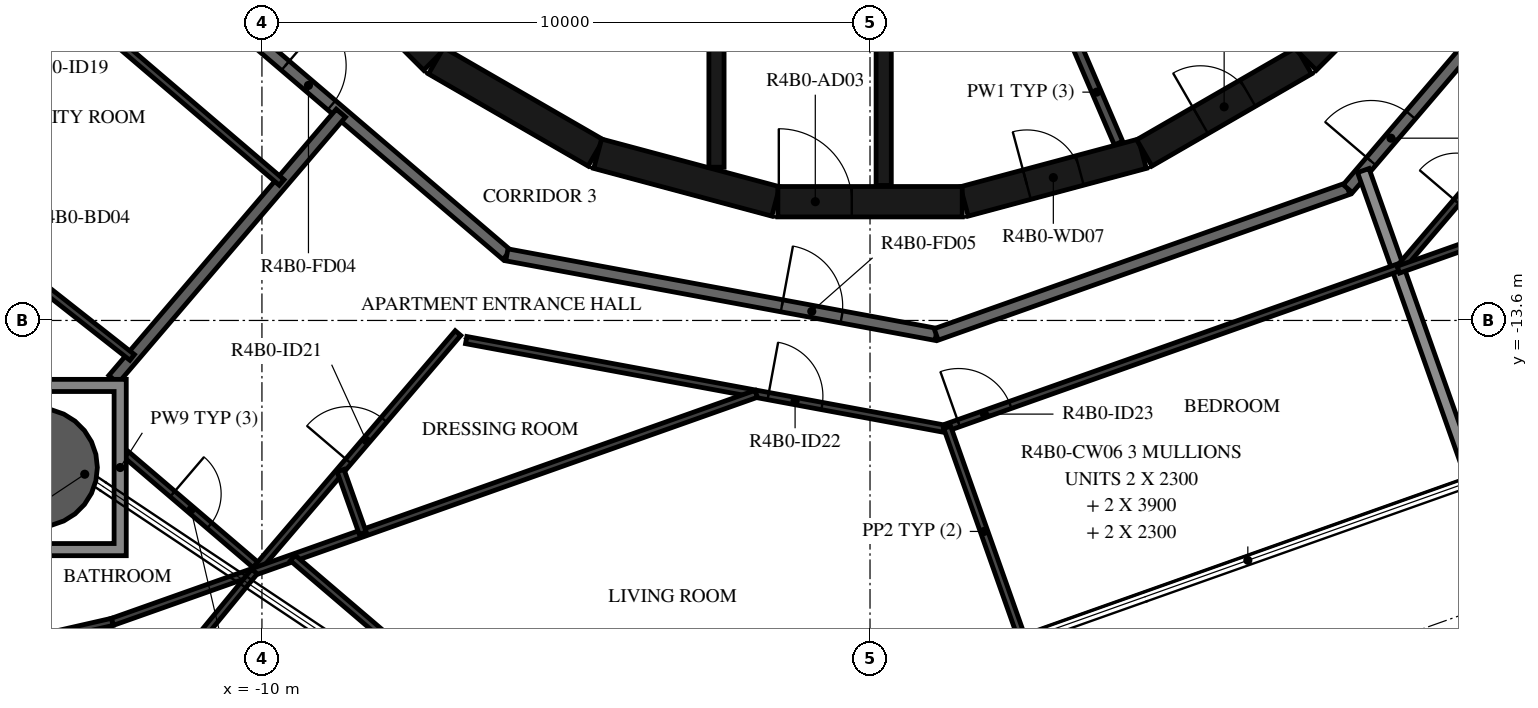
"""IFC4 building model, lengths in metres.
Left out: names, types, materials, properties, quantities, classifications, styles, units other than length and angle.
Written with IfcOpenShell. Run it as: python <this file> out.ifc"""

import sys

from ifc_helpers import new_model, si_unit, direction, frame, frame_2d, origin, origin_2d, place, context, subcontext, project, spatial, polyline, rectangle, hollow_circle, outline, extrude, element, fill, save


model = new_model("IFC4")
c1 = context("Model", 3, precision=1e-05, world=origin(), true_north=direction((0.0, 1.0)))
c2 = subcontext(c1, "Body", "Model", "MODEL_VIEW")
j1 = project(units=[si_unit("LENGTHUNIT", "METRE"), si_unit("PLANEANGLEUNIT", "RADIAN")], contexts=[c1])
p1 = place(None, origin())
s1 = spatial("IfcSite", under=j1, at=p1, CompositionType="ELEMENT")
p2 = place(p1, origin())
s2 = spatial("IfcBuilding", under=s1, at=p2, CompositionType="ELEMENT")
p3 = place(p2, frame((0.0, 0.0, 165.7)))
s3 = spatial("IfcBuildingStorey", under=s2, at=p3, CompositionType="ELEMENT", Elevation=165.7)
p4 = place(p3, frame((-13.681, -16.019, -0.38), z_axis=(0.0, 0.0, 1.0), x_axis=(1.0, 0.0, 0.0)))
e1 = element("IfcColumn", 1, at=p4, inside=s3, PredefinedType="COLUMN", context=c2, shape_type="SweptSolid", body=[
    extrude(hollow_circle(Radius=0.975, WallThickness=0.045, at=origin_2d()), origin(), (0.0, 0.0, 1.0), 3.5),
])
p5 = place(p3, frame((1.55, -11.643, 0.0), z_axis=(0.0, 0.0, 1.0), x_axis=(0.965948410781, 0.258734743916, 0.0)))
e2 = element("IfcWall", 2, at=p5, inside=s3, PredefinedType="SHEAR", context=c2, shape_type="SweptSolid", body=[
    extrude(rectangle(XDim=3.033, YDim=0.5, at=frame_2d((1.516, 0.0))), origin(), (0.0, 0.0, 1.0), 3.12),
])
p6 = place(p5, frame((1.066, 0.0, 0.0)))
e3 = element("IfcOpeningElement", 3, at=p6, cuts=e2, PredefinedType="OPENING", context=c2, shape_type="SweptSolid", body=[
    extrude(rectangle(XDim=0.9, YDim=2.1, at=frame_2d((0.45, 1.05))), frame((0.0, 0.26, 0.0), z_axis=(0.0, -1.0, 0.0), x_axis=(1.0, 0.0, 0.0)), (0.0, 0.0, 1.0), 0.52),
])
p7 = place(p3, frame((4.51, -10.845, 0.0), z_axis=(0.0, 0.0, 1.0), x_axis=(0.865975092491, 0.500087131594, 0.0)))
e4 = element("IfcWall", 4, at=p7, inside=s3, PredefinedType="SHEAR", context=c2, shape_type="SweptSolid", body=[
    extrude(rectangle(XDim=3.033, YDim=0.5, at=frame_2d((1.516, 0.0))), origin(), (0.0, 0.0, 1.0), 3.12),
])
p8 = place(p7, frame((1.066, 0.0, 0.0)))
e5 = element("IfcOpeningElement", 5, at=p8, cuts=e4, PredefinedType="OPENING", context=c2, shape_type="SweptSolid", body=[
    extrude(rectangle(XDim=0.9, YDim=2.1, at=frame_2d((0.45, 1.05))), frame((0.0, 0.26, 0.0), z_axis=(0.0, -1.0, 0.0), x_axis=(1.0, 0.0, 0.0)), (0.0, 0.0, 1.0), 0.52),
])
p9 = place(p3, frame((7.164, -9.308, 0.0), z_axis=(0.0, 0.0, 1.0), x_axis=(0.707106781187, 0.707106781187, 0.0)))
e6 = element("IfcWall", 6, at=p9, inside=s3, PredefinedType="SHEAR", context=c2, shape_type="SweptSolid", body=[
    extrude(rectangle(XDim=3.032, YDim=0.5, at=frame_2d((1.516, 0.0))), origin(), (0.0, 0.0, 1.0), 3.12),
])
p10 = place(p9, frame((1.566, 0.0, 0.0)))
e7 = element("IfcOpeningElement", 7, at=p10, cuts=e6, PredefinedType="OPENING", context=c2, shape_type="SweptSolid", body=[
    extrude(rectangle(XDim=0.9, YDim=2.1, at=frame_2d((0.45, 1.05))), frame((0.0, 0.26, 0.0), z_axis=(0.0, -1.0, 0.0), x_axis=(1.0, 0.0, 0.0)), (0.0, 0.0, 1.0), 0.52),
])
p11 = place(p3, frame((-9.308, -7.164, 0.0), z_axis=(0.0, 0.0, 1.0), x_axis=(0.707106781187, -0.707106781187, 0.0)))
e8 = element("IfcWall", 8, at=p11, inside=s3, PredefinedType="SHEAR", context=c2, shape_type="SweptSolid", body=[
    extrude(rectangle(XDim=3.032, YDim=0.5, at=frame_2d((1.516, 0.0))), origin(), (0.0, 0.0, 1.0), 3.12),
])
for number, where, z_axis, x_axis in (
    (9, (-7.137, -9.329, 0.0), (0.0, 0.0, 1.0), (0.866, -0.5, 0.0)),
    (10, (-4.479, -10.858, 0.0), (0.0, 0.0, 1.0), (0.966, -0.259, 0.0)),
):
    element("IfcWall", number, at=place(p3, frame(where, z_axis=z_axis, x_axis=x_axis)), inside=s3, PredefinedType="SHEAR", context=c2, shape_type="SweptSolid", body=[
        extrude(rectangle(XDim=3.033, YDim=0.5, at=frame_2d((1.516, 0.0))), origin(), (0.0, 0.0, 1.0), 3.12),
    ])
p12 = place(p3, frame((-1.516, -11.647, 0.0), z_axis=(0.0, 0.0, 1.0), x_axis=(1.0, 0.0, 0.0)))
e11 = element("IfcWall", 11, at=p12, inside=s3, PredefinedType="SHEAR", context=c2, shape_type="SweptSolid", body=[
    extrude(rectangle(XDim=3.033, YDim=0.5, at=frame_2d((1.516, 0.0))), origin(), (0.0, 0.0, 1.0), 3.12),
])
p13 = place(p12, frame((0.016, 0.0, 0.0)))
e12 = element("IfcOpeningElement", 12, at=p13, cuts=e11, PredefinedType="OPENING", context=c2, shape_type="SweptSolid", body=[
    extrude(rectangle(XDim=1.2, YDim=2.1, at=frame_2d((0.6, 1.05))), frame((0.0, 0.26, 0.0), z_axis=(0.0, -1.0, 0.0), x_axis=(1.0, 0.0, 0.0)), (0.0, 0.0, 1.0), 0.52),
])
p14 = place(p3, frame((-2.525, -8.97, 0.0), z_axis=(0.0, 0.0, 1.0), x_axis=(0.0, -1.0, 0.0)))
e13 = element("IfcWall", 13, at=p14, inside=s3, PredefinedType="SHEAR", context=c2, shape_type="SweptSolid", body=[
    extrude(rectangle(XDim=2.11, YDim=0.25, at=frame_2d((1.055, 0.0))), origin(), (0.0, 0.0, 1.0), 3.12),
])
p15 = place(p3, frame((0.225, -8.97, 0.0), z_axis=(0.0, 0.0, 1.0), x_axis=(0.0, -1.0, 0.0)))
e14 = element("IfcWall", 14, at=p15, inside=s3, PredefinedType="SHEAR", context=c2, shape_type="SweptSolid", body=[
    extrude(rectangle(XDim=2.41, YDim=0.25, at=frame_2d((1.205, 0.0))), origin(), (0.0, 0.0, 1.0), 3.12),
])
p16 = place(p3, frame((3.367, -9.007, 0.0), z_axis=(0.0, 0.0, 1.0), x_axis=(0.394387482265, -0.918944238696, 0.0)))
e15 = element("IfcWall", 15, at=p16, inside=s3, PredefinedType="PARTITIONING", context=c2, shape_type="SweptSolid", body=[
    extrude(rectangle(XDim=1.825, YDim=0.15, at=frame_2d((0.913, 0.0))), origin(), (0.0, 0.0, 1.0), 3.12),
])
p17 = place(p3, frame((-11.433, -7.858, 0.0), z_axis=(0.0, 0.0, 1.0), x_axis=(0.760412154545, -0.649440801937, 0.0)))
e16 = element("IfcWall", 16, at=p17, inside=s3, PredefinedType="STANDARD", context=c2, shape_type="SweptSolid", body=[
    extrude(rectangle(XDim=7.181, YDim=0.2, at=frame_2d((3.59, 0.0))), origin(), (0.0, 0.0, 1.0), 3.12),
])
p18 = place(p17, frame((2.39, 0.0, 0.0)))
e17 = element("IfcOpeningElement", 17, at=p18, cuts=e16, PredefinedType="OPENING", context=c2, shape_type="SweptSolid", body=[
    extrude(rectangle(XDim=1.0, YDim=2.1, at=frame_2d((0.5, 1.05))), frame((0.0, 0.11, 0.0), z_axis=(0.0, -1.0, 0.0), x_axis=(1.0, 0.0, 0.0)), (0.0, 0.0, 1.0), 0.22),
])
p19 = place(p3, frame((-5.972, -12.521, 0.0), z_axis=(0.0, 0.0, 1.0), x_axis=(0.983256068163, -0.18222926335, 0.0)))
e18 = element("IfcWall", 18, at=p19, inside=s3, PredefinedType="STANDARD", context=c2, shape_type="SweptSolid", body=[
    extrude(rectangle(XDim=7.181, YDim=0.2, at=frame_2d((3.59, 0.0))), origin(), (0.0, 0.0, 1.0), 3.12),
])
p20 = place(p19, frame((4.6, 0.0, 0.0)))
e19 = element("IfcOpeningElement", 19, at=p20, cuts=e18, PredefinedType="OPENING", context=c2, shape_type="SweptSolid", body=[
    extrude(rectangle(XDim=1.0, YDim=2.1, at=frame_2d((0.5, 1.05))), frame((0.0, 0.11, 0.0), z_axis=(0.0, -1.0, 0.0), x_axis=(1.0, 0.0, 0.0)), (0.0, 0.0, 1.0), 0.22),
])
p21 = place(p3, frame((1.088, -13.83, 0.0), z_axis=(0.0, 0.0, 1.0), x_axis=(0.942648397945, 0.333787354241, 0.0)))
e20 = element("IfcWall", 20, at=p21, inside=s3, PredefinedType="STANDARD", context=c2, shape_type="SweptSolid", body=[
    extrude(rectangle(XDim=7.181, YDim=0.2, at=frame_2d((3.591, 0.0))), origin(), (0.0, 0.0, 1.0), 3.12),
])
p22 = place(p3, frame((7.858, -11.433, 0.0), z_axis=(0.0, 0.0, 1.0), x_axis=(0.649440801937, 0.760412154545, 0.0)))
e21 = element("IfcWall", 21, at=p22, inside=s3, PredefinedType="STANDARD", context=c2, shape_type="SweptSolid", body=[
    extrude(rectangle(XDim=7.181, YDim=0.2, at=frame_2d((3.59, 0.0))), origin(), (0.0, 0.0, 1.0), 3.12),
])
p23 = place(p22, frame((0.592, 0.0, 0.0)))
e22 = element("IfcOpeningElement", 22, at=p23, cuts=e21, PredefinedType="OPENING", context=c2, shape_type="SweptSolid", body=[
    extrude(rectangle(XDim=1.0, YDim=2.1, at=frame_2d((0.5, 1.05))), frame((0.0, 0.11, 0.0), z_axis=(0.0, -1.0, 0.0), x_axis=(1.0, 0.0, 0.0)), (0.0, 0.0, 1.0), 0.22),
])
p24 = place(p3, frame((-12.441, -14.569, 0.0), z_axis=(0.0, 0.0, 1.0), x_axis=(0.649446013128, 0.760407703822, 0.0)))
e23 = element("IfcWall", 23, at=p24, inside=s3, PredefinedType="STANDARD", context=c2, shape_type="SweptSolid", body=[
    extrude(rectangle(XDim=5.758, YDim=0.2, at=frame_2d((2.879, 0.0))), origin(), (0.0, 0.0, 1.0), 3.12),
])
p25 = place(p3, frame((9.891, -16.158, 0.0), z_axis=(0.0, 0.0, 1.0), x_axis=(-0.333807281402, 0.942641341594, 0.0)))
e24 = element("IfcWall", 24, at=p25, inside=s3, PredefinedType="STANDARD", context=c2, shape_type="SweptSolid", body=[
    extrude(rectangle(XDim=5.329, YDim=0.2, at=frame_2d((2.665, 0.0))), origin(), (0.0, 0.0, 1.0), 2.73),
])
p26 = place(p3, frame((-12.713, -8.737, 0.0), z_axis=(0.0, 0.0, 1.0), x_axis=(0.760420863476, -0.649430604754, 0.0)))
e25 = element("IfcWall", 25, at=p26, inside=s3, PredefinedType="PARTITIONING", context=c2, shape_type="SweptSolid", body=[
    extrude(rectangle(XDim=3.992, YDim=0.12, at=frame_2d((1.996, 0.0))), origin(), (0.0, 0.0, 1.0), 3.12),
])
p27 = place(p3, frame((-15.677, -11.42, 0.0), z_axis=(0.0, 0.0, 1.0), x_axis=(0.785821888461, -0.618452875824, 0.0)))
e26 = element("IfcWall", 26, at=p27, inside=s3, PredefinedType="PARTITIONING", context=c2, shape_type="SweptSolid", body=[
    extrude(rectangle(XDim=4.507, YDim=0.12, at=frame_2d((2.254, 0.0))), origin(), (0.0, 0.0, 1.0), 3.12),
])
p28 = place(p27, frame((0.4, 0.0, 0.0)))
e27 = element("IfcOpeningElement", 27, at=p28, cuts=e26, PredefinedType="OPENING", context=c2, shape_type="SweptSolid", body=[
    extrude(rectangle(XDim=0.8, YDim=2.1, at=frame_2d((0.4, 1.05))), frame((0.0, 0.07, 0.0), z_axis=(0.0, -1.0, 0.0), x_axis=(1.0, 0.0, 0.0)), (0.0, 0.0, 1.0), 0.14),
])
p29 = place(p3, frame((-12.231, -15.804, 0.0), z_axis=(0.0, 0.0, 1.0), x_axis=(0.760403625387, -0.649450788357, 0.0)))
e28 = element("IfcWall", 28, at=p29, inside=s3, PredefinedType="PARTITIONING", context=c2, shape_type="SweptSolid", body=[
    extrude(rectangle(XDim=2.852, YDim=0.12, at=frame_2d((1.426, 0.0))), origin(), (0.0, 0.0, 1.0), 3.12),
])
p30 = place(p29, frame((1.0, 0.0, 0.0)))
e29 = element("IfcOpeningElement", 29, at=p30, cuts=e28, PredefinedType="OPENING", context=c2, shape_type="SweptSolid", body=[
    extrude(rectangle(XDim=0.8, YDim=2.1, at=frame_2d((0.4, 1.05))), frame((0.0, 0.07, 0.0), z_axis=(0.0, -1.0, 0.0), x_axis=(1.0, 0.0, 0.0)), (0.0, 0.0, 1.0), 0.14),
])
p31 = place(p3, frame((-10.063, -17.656, 0.0), z_axis=(0.0, 0.0, 1.0), x_axis=(0.649451567172, 0.760402960211, 0.0)))
e30 = element("IfcWall", 30, at=p31, inside=s3, PredefinedType="PARTITIONING", context=c2, shape_type="SweptSolid", body=[
    extrude(rectangle(XDim=5.061, YDim=0.12, at=frame_2d((2.531, 0.0))), origin(), (0.0, 0.0, 1.0), 3.12),
])
p32 = place(p31, frame((2.288, 0.0, 0.0)))
e31 = element("IfcOpeningElement", 31, at=p32, cuts=e30, PredefinedType="OPENING", context=c2, shape_type="SweptSolid", body=[
    extrude(rectangle(XDim=0.9, YDim=2.1, at=frame_2d((0.45, 1.05))), frame((0.0, 0.07, 0.0), z_axis=(0.0, -1.0, 0.0), x_axis=(1.0, 0.0, 0.0)), (0.0, 0.0, 1.0), 0.14),
])
p33 = place(p3, frame((-6.641, -13.923, 0.0), z_axis=(0.0, 0.0, 1.0), x_axis=(0.983250157272, -0.182261153912, 0.0)))
e32 = element("IfcWall", 32, at=p33, inside=s3, PredefinedType="PARTITIONING", context=c2, shape_type="SweptSolid", body=[
    extrude(rectangle(XDim=7.985, YDim=0.12, at=frame_2d((3.992, 0.0))), origin(), (0.0, 0.0, 1.0), 3.12),
])
p34 = place(p33, frame((5.051, 0.0, 0.0)))
e33 = element("IfcOpeningElement", 33, at=p34, cuts=e32, PredefinedType="OPENING", context=c2, shape_type="SweptSolid", body=[
    extrude(rectangle(XDim=0.9, YDim=2.1, at=frame_2d((0.45, 1.05))), frame((0.0, 0.07, 0.0), z_axis=(0.0, -1.0, 0.0), x_axis=(1.0, 0.0, 0.0)), (0.0, 0.0, 1.0), 0.14),
])
p35 = place(p3, frame((1.269, -15.357, 0.0), z_axis=(0.0, 0.0, 1.0), x_axis=(0.942639442898, 0.333812643101, 0.0)))
e34 = element("IfcWall", 34, at=p35, inside=s3, PredefinedType="PARTITIONING", context=c2, shape_type="SweptSolid", body=[
    extrude(rectangle(XDim=7.86, YDim=0.12, at=frame_2d((3.93, 0.0))), origin(), (0.0, 0.0, 1.0), 3.12),
])
p36 = place(p35, frame((0.2, 0.0, 0.0)))
e35 = element("IfcOpeningElement", 35, at=p36, cuts=e34, PredefinedType="OPENING", context=c2, shape_type="SweptSolid", body=[
    extrude(rectangle(XDim=0.9, YDim=2.1, at=frame_2d((0.45, 1.05))), frame((0.0, 0.07, 0.0), z_axis=(0.0, -1.0, 0.0), x_axis=(1.0, 0.0, 0.0)), (0.0, 0.0, 1.0), 0.14),
])
p37 = place(p3, frame((-1.871, -14.807, 0.0), z_axis=(0.0, 0.0, 1.0), x_axis=(-0.942640759962, -0.333808923874, 0.0)))
e36 = element("IfcWall", 36, at=p37, inside=s3, PredefinedType="PARTITIONING", context=c2, shape_type="SweptSolid", body=[
    extrude(rectangle(XDim=11.234, YDim=0.12, at=frame_2d((5.617, 0.0))), origin(), (0.0, 0.0, 1.0), 3.12),
])
p38 = place(p3, frame((-12.461, -18.557, 0.0), z_axis=(0.0, 0.0, 1.0), x_axis=(-0.975039040601, -0.222033486897, 0.0)))
e37 = element("IfcWall", 37, at=p38, inside=s3, PredefinedType="PARTITIONING", context=c2, shape_type="SweptSolid", body=[
    extrude(rectangle(XDim=0.947, YDim=0.12, at=frame_2d((0.473, 0.0))), origin(), (0.0, 0.0, 1.0), 3.12),
])
p39 = place(p3, frame((-15.146, -23.841, 0.0), z_axis=(0.0, 0.0, 1.0), x_axis=(0.634970373647, 0.772536487547, 0.0)))
e38 = element("IfcWall", 38, at=p39, inside=s3, PredefinedType="PARTITIONING", context=c2, shape_type="SweptSolid", body=[
    extrude(rectangle(XDim=7.912, YDim=0.12, at=frame_2d((3.956, 0.0))), origin(), (0.0, 0.0, 1.0), 3.12),
])
p40 = place(p39, frame((0.5, 0.0, 0.0)))
e39 = element("IfcOpeningElement", 39, at=p40, cuts=e38, PredefinedType="OPENING", context=c2, shape_type="SweptSolid", body=[
    extrude(rectangle(XDim=0.9, YDim=2.1, at=frame_2d((0.45, 1.05))), frame((0.0, 0.07, 0.0), z_axis=(0.0, -1.0, 0.0), x_axis=(1.0, 0.0, 0.0)), (0.0, 0.0, 1.0), 0.14),
])
p41 = place(p3, frame((-8.342, -17.098, 0.0), z_axis=(0.0, 0.0, 1.0), x_axis=(-0.333801646268, 0.942643337084, 0.0)))
e40 = element("IfcWall", 40, at=p41, inside=s3, PredefinedType="PARTITIONING", context=c2, shape_type="SweptSolid", body=[
    extrude(rectangle(XDim=1.093, YDim=0.12, at=frame_2d((0.546, 0.0))), origin(), (0.0, 0.0, 1.0), 3.12),
])
p42 = place(p3, frame((-4.927, -21.406, 0.0), z_axis=(0.0, 0.0, 1.0), x_axis=(-0.760409236665, 0.649444218385, 0.0)))
e41 = element("IfcWall", 41, at=p42, inside=s3, PredefinedType="PARTITIONING", context=c2, shape_type="SweptSolid", body=[
    extrude(rectangle(XDim=6.004, YDim=0.12, at=frame_2d((3.002, 0.0))), origin(), (0.0, 0.0, 1.0), 3.12),
])
p43 = place(p42, frame((0.4, 0.0, 0.0)))
e42 = element("IfcOpeningElement", 42, at=p43, cuts=e41, PredefinedType="OPENING", context=c2, shape_type="SweptSolid", body=[
    extrude(rectangle(XDim=0.9, YDim=2.1, at=frame_2d((0.45, 1.05))), frame((0.0, 0.07, 0.0), z_axis=(0.0, -1.0, 0.0), x_axis=(1.0, 0.0, 0.0)), (0.0, 0.0, 1.0), 0.14),
])
p44 = place(p3, frame((2.482, -18.782, 0.0), z_axis=(0.0, 0.0, 1.0), x_axis=(-0.33379364943, 0.942646168825, 0.0)))
e43 = element("IfcWall", 43, at=p44, inside=s3, PredefinedType="PARTITIONING", context=c2, shape_type="SweptSolid", body=[
    extrude(rectangle(XDim=3.633, YDim=0.12, at=frame_2d((1.816, 0.0))), origin(), (0.0, 0.0, 1.0), 2.73),
])
p45 = place(p3, frame((8.737, -12.713, 0.0), z_axis=(0.0, 0.0, 1.0), x_axis=(0.649430604754, 0.760420863476, 0.0)))
e44 = element("IfcWall", 44, at=p45, inside=s3, PredefinedType="PARTITIONING", context=c2, shape_type="SweptSolid", body=[
    extrude(rectangle(XDim=7.985, YDim=0.12, at=frame_2d((3.992, 0.0))), origin(), (0.0, 0.0, 1.0), 3.12),
])
p46 = place(p45, frame((1.4, 0.0, 0.0)))
e45 = element("IfcOpeningElement", 45, at=p46, cuts=e44, PredefinedType="OPENING", context=c2, shape_type="SweptSolid", body=[
    extrude(rectangle(XDim=0.8, YDim=2.1, at=frame_2d((0.4, 1.05))), frame((0.0, 0.07, 0.0), z_axis=(0.0, -1.0, 0.0), x_axis=(1.0, 0.0, 0.0)), (0.0, 0.0, 1.0), 0.14),
])
p47 = place(p3, frame((14.183, -10.819, 0.0), z_axis=(0.0, 0.0, 1.0), x_axis=(-0.942646448855, -0.333792858612, 0.0)))
e46 = element("IfcWall", 46, at=p47, inside=s3, PredefinedType="PARTITIONING", context=c2, shape_type="SweptSolid", body=[
    extrude(rectangle(XDim=5.828, YDim=0.12, at=frame_2d((2.914, 0.0))), origin(), (0.0, 0.0, 1.0), 3.12),
])
p48 = place(p3, origin())
e47 = element("IfcWall", 47, at=p48, inside=s3, PredefinedType="STANDARD", context=c2, shape_type="SweptSolid", body=[
    extrude(outline(polyline([(-12.231, -14.569), (-12.231, -17.469), (-15.131, -17.469), (-15.131, -14.569), (-12.231, -14.569)]), holes=[polyline([(-14.931, -17.269), (-12.431, -17.269), (-12.431, -14.769), (-14.931, -14.769), (-14.931, -17.269)])]), origin(), (0.0, 0.0, 1.0), 3.12),
])
p49 = place(p13, origin())
e48 = element("IfcDoor", 48, at=p49, inside=s3, OperationType="SINGLE_SWING_RIGHT", PredefinedType="DOOR", context=c2, shape_type="SweptSolid", body=[
    extrude(rectangle(XDim=1.2, YDim=2.1, at=frame_2d((0.6, 1.05))), frame((0.0, 0.025, 0.0), z_axis=(0.0, -1.0, 0.0), x_axis=(1.0, 0.0, 0.0)), (0.0, 0.0, 1.0), 0.05),
])
fill(e12, e48)
p50 = place(p6, origin())
e49 = element("IfcDoor", 49, at=p50, inside=s3, OperationType="SINGLE_SWING_LEFT", PredefinedType="DOOR", context=c2, shape_type="SweptSolid", body=[
    extrude(rectangle(XDim=0.9, YDim=2.1, at=frame_2d((0.45, 1.05))), frame((0.0, 0.025, 0.0), z_axis=(0.0, -1.0, 0.0), x_axis=(1.0, 0.0, 0.0)), (0.0, 0.0, 1.0), 0.05),
])
fill(e3, e49)
p51 = place(p8, origin())
e50 = element("IfcDoor", 50, at=p51, inside=s3, OperationType="SINGLE_SWING_RIGHT", PredefinedType="DOOR", context=c2, shape_type="SweptSolid", body=[
    extrude(rectangle(XDim=0.9, YDim=2.1, at=frame_2d((0.45, 1.05))), frame((0.0, 0.025, 0.0), z_axis=(0.0, -1.0, 0.0), x_axis=(1.0, 0.0, 0.0)), (0.0, 0.0, 1.0), 0.05),
])
fill(e5, e50)
p52 = place(p18, origin())
e51 = element("IfcDoor", 51, at=p52, inside=s3, OperationType="SINGLE_SWING_RIGHT", PredefinedType="DOOR", context=c2, shape_type="SweptSolid", body=[
    extrude(rectangle(XDim=1.0, YDim=2.1, at=frame_2d((0.5, 1.05))), frame((0.0, 0.025, 0.0), z_axis=(0.0, -1.0, 0.0), x_axis=(1.0, 0.0, 0.0)), (0.0, 0.0, 1.0), 0.05),
])
fill(e17, e51)
p53 = place(p20, origin())
e52 = element("IfcDoor", 52, at=p53, inside=s3, OperationType="SINGLE_SWING_LEFT", PredefinedType="DOOR", context=c2, shape_type="SweptSolid", body=[
    extrude(rectangle(XDim=1.0, YDim=2.1, at=frame_2d((0.5, 1.05))), frame((0.0, 0.025, 0.0), z_axis=(0.0, -1.0, 0.0), x_axis=(1.0, 0.0, 0.0)), (0.0, 0.0, 1.0), 0.05),
])
fill(e19, e52)
p54 = place(p30, origin())
e53 = element("IfcDoor", 53, at=p54, inside=s3, OperationType="SINGLE_SWING_LEFT", PredefinedType="DOOR", context=c2, shape_type="SweptSolid", body=[
    extrude(rectangle(XDim=0.8, YDim=2.1, at=frame_2d((0.4, 1.05))), frame((0.0, 0.025, 0.0), z_axis=(0.0, -1.0, 0.0), x_axis=(1.0, 0.0, 0.0)), (0.0, 0.0, 1.0), 0.05),
])
fill(e29, e53)
p55 = place(p32, origin())
e54 = element("IfcDoor", 54, at=p55, inside=s3, OperationType="SINGLE_SWING_LEFT", PredefinedType="DOOR", context=c2, shape_type="SweptSolid", body=[
    extrude(rectangle(XDim=0.9, YDim=2.1, at=frame_2d((0.45, 1.05))), frame((0.0, 0.025, 0.0), z_axis=(0.0, -1.0, 0.0), x_axis=(1.0, 0.0, 0.0)), (0.0, 0.0, 1.0), 0.05),
])
fill(e31, e54)
p56 = place(p34, origin())
e55 = element("IfcDoor", 55, at=p56, inside=s3, OperationType="SINGLE_SWING_LEFT", PredefinedType="DOOR", context=c2, shape_type="SweptSolid", body=[
    extrude(rectangle(XDim=0.9, YDim=2.1, at=frame_2d((0.45, 1.05))), frame((0.0, 0.025, 0.0), z_axis=(0.0, -1.0, 0.0), x_axis=(1.0, 0.0, 0.0)), (0.0, 0.0, 1.0), 0.05),
])
fill(e33, e55)
p57 = place(p36, origin())
e56 = element("IfcDoor", 56, at=p57, inside=s3, OperationType="SINGLE_SWING_LEFT", PredefinedType="DOOR", context=c2, shape_type="SweptSolid", body=[
    extrude(rectangle(XDim=0.9, YDim=2.1, at=frame_2d((0.45, 1.05))), frame((0.0, 0.025, 0.0), z_axis=(0.0, -1.0, 0.0), x_axis=(1.0, 0.0, 0.0)), (0.0, 0.0, 1.0), 0.05),
])
fill(e35, e56)
p58 = place(p23, origin())
e57 = element("IfcDoor", 57, at=p58, inside=s3, OperationType="SINGLE_SWING_RIGHT", PredefinedType="DOOR", context=c2, shape_type="SweptSolid", body=[
    extrude(rectangle(XDim=1.0, YDim=2.1, at=frame_2d((0.5, 1.05))), frame((0.0, 0.025, 0.0), z_axis=(0.0, -1.0, 0.0), x_axis=(1.0, 0.0, 0.0)), (0.0, 0.0, 1.0), 0.05),
])
fill(e22, e57)
p59 = place(p46, origin())
e58 = element("IfcDoor", 58, at=p59, inside=s3, OperationType="SINGLE_SWING_RIGHT", PredefinedType="DOOR", context=c2, shape_type="SweptSolid", body=[
    extrude(rectangle(XDim=0.8, YDim=2.1, at=frame_2d((0.4, 1.05))), frame((0.0, 0.025, 0.0), z_axis=(0.0, -1.0, 0.0), x_axis=(1.0, 0.0, 0.0)), (0.0, 0.0, 1.0), 0.05),
])
fill(e45, e58)
save(model, sys.argv[1])
